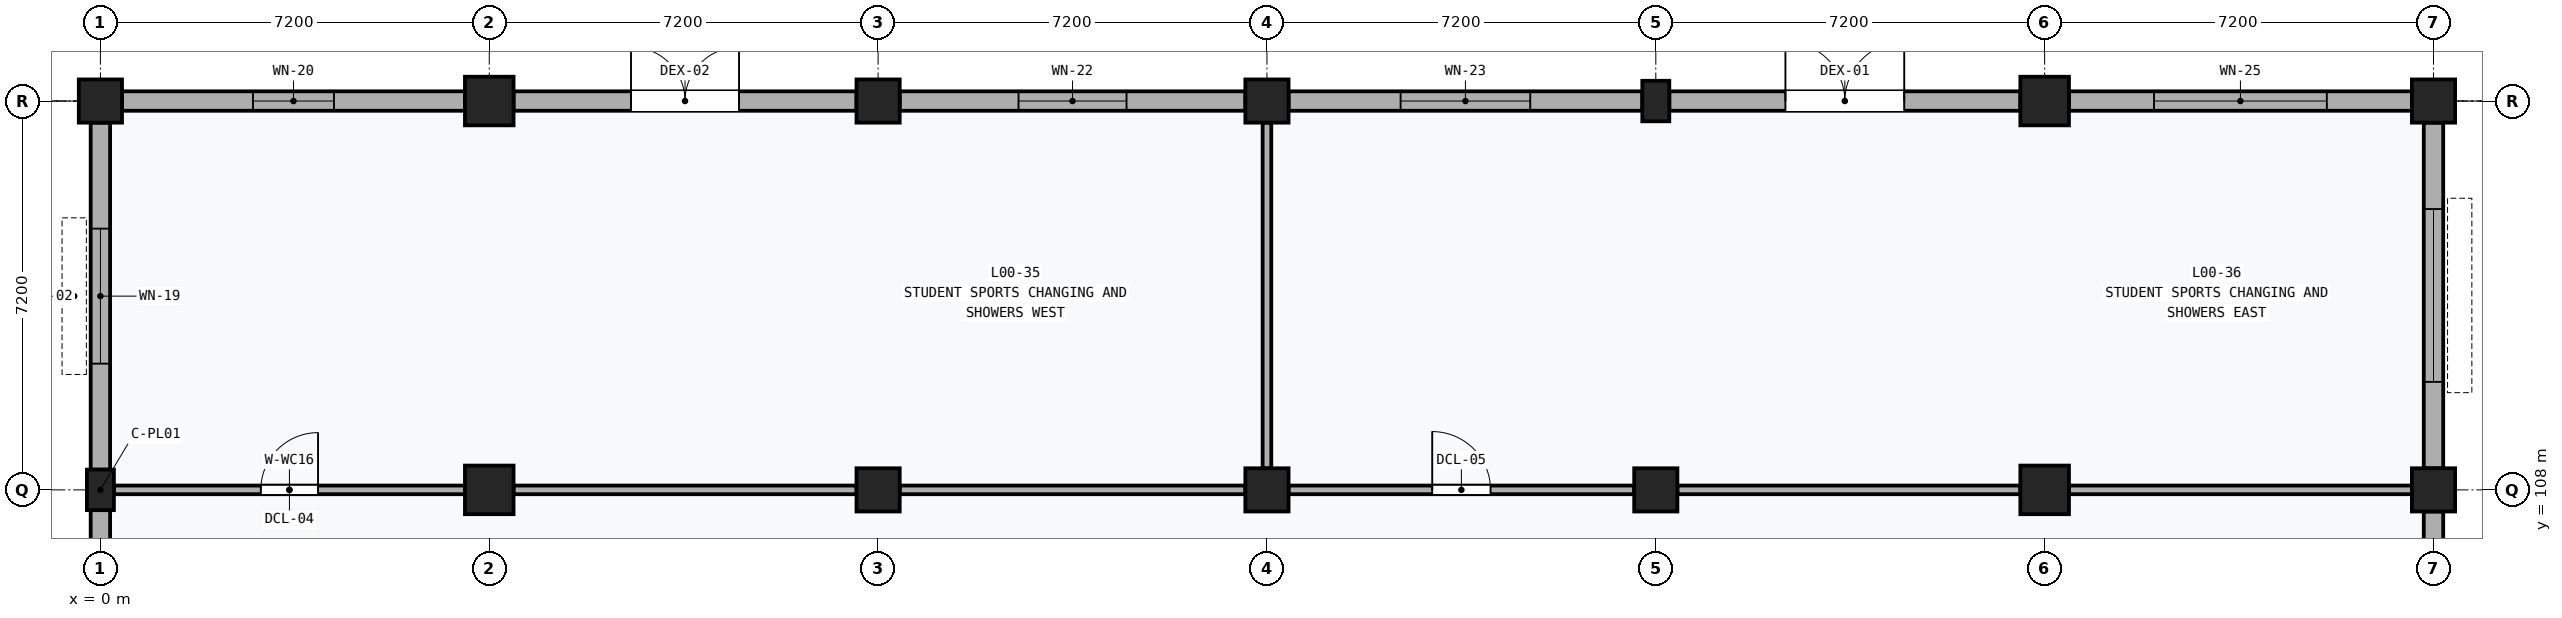
"""IFC4 building model, lengths in metres.
Left out: names, types, materials, properties, quantities, classifications, styles, units other than length and angle.
Written with IfcOpenShell. Run it as: python <this file> out.ifc"""

import sys

from ifc_helpers import new_model, si_unit, direction, frame, frame_2d, origin, origin_2d, place, context, subcontext, project, spatial, rectangle, extrude, element, fill, save


model = new_model("IFC4")
c1 = context("Model", 3, precision=1e-05, world=origin(), true_north=direction((0.0, 1.0)))
c2 = subcontext(c1, "Body", "Model", "MODEL_VIEW")
j1 = project(units=[si_unit("LENGTHUNIT", "METRE"), si_unit("PLANEANGLEUNIT", "RADIAN")], contexts=[c1])
p1 = place(None, origin())
s1 = spatial("IfcSite", under=j1, at=p1, CompositionType="ELEMENT")
p2 = place(p1, origin())
s2 = spatial("IfcBuilding", under=s1, at=p2, CompositionType="ELEMENT")
p3 = place(p2, origin())
s3 = spatial("IfcBuildingStorey", under=s2, at=p3, CompositionType="ELEMENT", Elevation=0.0)
p4 = place(p3, frame((0.0, 108.0, 0.0), z_axis=(0.0, 0.0, 1.0), x_axis=(1.0, 0.0, 0.0)))
e1 = element("IfcColumn", 1, at=p4, inside=s3, PredefinedType="PILASTER", context=c2, shape_type="SweptSolid", body=[
    extrude(rectangle(XDim=0.5, YDim=0.75, at=origin_2d()), origin(), (0.0, 0.0, 1.0), 4.8),
])
p5 = place(p3, frame((0.0, 115.2, 0.0), z_axis=(0.0, 0.0, 1.0), x_axis=(1.0, 0.0, 0.0)))
e2 = element("IfcColumn", 2, at=p5, inside=s3, PredefinedType="COLUMN", context=c2, shape_type="SweptSolid", body=[
    extrude(rectangle(XDim=0.8, YDim=0.8, at=origin_2d()), origin(), (0.0, 0.0, 1.0), 4.8),
])
for number, where, z_axis, x_axis in (
    (3, (7.2, 108.0, 0.0), (0.0, 0.0, 1.0), (1.0, 0.0, 0.0)),
    (4, (7.2, 115.2, 0.0), (0.0, 0.0, 1.0), (1.0, 0.0, 0.0)),
):
    element("IfcColumn", number, at=place(p3, frame(where, z_axis=z_axis, x_axis=x_axis)), inside=s3, PredefinedType="COLUMN", context=c2, shape_type="SweptSolid", body=[
        extrude(rectangle(XDim=0.9, YDim=0.9, at=origin_2d()), origin(), (0.0, 0.0, 1.0), 4.8),
    ])
for number, where, z_axis, x_axis in (
    (5, (14.4, 108.0, 0.0), (0.0, 0.0, 1.0), (1.0, 0.0, 0.0)),
    (6, (14.4, 115.2, 0.0), (0.0, 0.0, 1.0), (1.0, 0.0, 0.0)),
    (7, (21.6, 108.0, 0.0), (0.0, 0.0, 1.0), (1.0, 0.0, 0.0)),
    (8, (21.6, 115.2, 0.0), (0.0, 0.0, 1.0), (1.0, 0.0, 0.0)),
    (9, (28.8, 108.0, 0.0), (0.0, 0.0, 1.0), (1.0, 0.0, 0.0)),
):
    element("IfcColumn", number, at=place(p3, frame(where, z_axis=z_axis, x_axis=x_axis)), inside=s3, PredefinedType="COLUMN", context=c2, shape_type="SweptSolid", body=[
        extrude(rectangle(XDim=0.8, YDim=0.8, at=origin_2d()), origin(), (0.0, 0.0, 1.0), 4.8),
    ])
p6 = place(p3, frame((28.8, 115.2, 0.0), z_axis=(0.0, 0.0, 1.0), x_axis=(1.0, 0.0, 0.0)))
e10 = element("IfcColumn", 10, at=p6, inside=s3, PredefinedType="PILASTER", context=c2, shape_type="SweptSolid", body=[
    extrude(rectangle(XDim=0.5, YDim=0.75, at=origin_2d()), origin(), (0.0, 0.0, 1.0), 4.8),
])
for number, where, z_axis, x_axis in (
    (11, (36.0, 108.0, 0.0), (0.0, 0.0, 1.0), (1.0, 0.0, 0.0)),
    (12, (36.0, 115.2, 0.0), (0.0, 0.0, 1.0), (1.0, 0.0, 0.0)),
):
    element("IfcColumn", number, at=place(p3, frame(where, z_axis=z_axis, x_axis=x_axis)), inside=s3, PredefinedType="COLUMN", context=c2, shape_type="SweptSolid", body=[
        extrude(rectangle(XDim=0.9, YDim=0.9, at=origin_2d()), origin(), (0.0, 0.0, 1.0), 4.8),
    ])
for number, where, z_axis, x_axis in (
    (13, (43.2, 108.0, 0.0), (0.0, 0.0, 1.0), (1.0, 0.0, 0.0)),
    (14, (43.2, 115.2, 0.0), (0.0, 0.0, 1.0), (1.0, 0.0, 0.0)),
):
    element("IfcColumn", number, at=place(p3, frame(where, z_axis=z_axis, x_axis=x_axis)), inside=s3, PredefinedType="COLUMN", context=c2, shape_type="SweptSolid", body=[
        extrude(rectangle(XDim=0.8, YDim=0.8, at=origin_2d()), origin(), (0.0, 0.0, 1.0), 4.8),
    ])
p7 = place(p3, frame((0.0, 101.2, 0.0), z_axis=(0.0, 0.0, 1.0), x_axis=(0.0, 1.0, 0.0)))
e15 = element("IfcWall", 15, at=p7, inside=s3, PredefinedType="SOLIDWALL", context=c2, shape_type="SweptSolid", body=[
    extrude(rectangle(XDim=6.425, YDim=0.36, at=frame_2d((3.212, 0.0))), origin(), (0.0, 0.0, 1.0), 3.89),
])
p8 = place(p7, frame((2.113, 0.0, 1.1)))
e16 = element("IfcOpeningElement", 16, at=p8, cuts=e15, PredefinedType="OPENING", context=c2, shape_type="SweptSolid", body=[
    extrude(rectangle(XDim=2.2, YDim=1.5, at=frame_2d((1.1, 0.75))), frame((0.0, 0.192, 0.0), z_axis=(0.0, -1.0, 0.0), x_axis=(1.0, 0.0, 0.0)), (0.0, 0.0, 1.0), 0.384),
])
p9 = place(p3, frame((0.4, 115.2, 0.0), z_axis=(0.0, 0.0, 1.0), x_axis=(1.0, 0.0, 0.0)))
e17 = element("IfcWall", 17, at=p9, inside=s3, PredefinedType="SOLIDWALL", context=c2, shape_type="SweptSolid", body=[
    extrude(rectangle(XDim=6.35, YDim=0.36, at=frame_2d((3.175, 0.0))), origin(), (0.0, 0.0, 1.0), 3.89),
])
p10 = place(p9, frame((2.425, 0.0, 1.2)))
e18 = element("IfcOpeningElement", 18, at=p10, cuts=e17, PredefinedType="OPENING", context=c2, shape_type="SweptSolid", body=[
    extrude(rectangle(XDim=1.5, YDim=1.35, at=frame_2d((0.75, 0.675))), frame((0.0, 0.192, 0.0), z_axis=(0.0, -1.0, 0.0), x_axis=(1.0, 0.0, 0.0)), (0.0, 0.0, 1.0), 0.384),
])
p11 = place(p3, frame((0.0, 108.375, 0.0), z_axis=(0.0, 0.0, 1.0), x_axis=(0.0, 1.0, 0.0)))
e19 = element("IfcWall", 19, at=p11, inside=s3, PredefinedType="SOLIDWALL", context=c2, shape_type="SweptSolid", body=[
    extrude(rectangle(XDim=6.425, YDim=0.36, at=frame_2d((3.212, 0.0))), origin(), (0.0, 0.0, 1.0), 3.89),
])
p12 = place(p11, frame((1.962, 0.0, 1.1)))
e20 = element("IfcOpeningElement", 20, at=p12, cuts=e19, PredefinedType="OPENING", context=c2, shape_type="SweptSolid", body=[
    extrude(rectangle(XDim=2.5, YDim=1.5, at=frame_2d((1.25, 0.75))), frame((0.0, 0.192, 0.0), z_axis=(0.0, -1.0, 0.0), x_axis=(1.0, 0.0, 0.0)), (0.0, 0.0, 1.0), 0.384),
])
p13 = place(p3, frame((7.65, 115.2, 0.0), z_axis=(0.0, 0.0, 1.0), x_axis=(1.0, 0.0, 0.0)))
e21 = element("IfcWall", 21, at=p13, inside=s3, PredefinedType="SOLIDWALL", context=c2, shape_type="SweptSolid", body=[
    extrude(rectangle(XDim=6.35, YDim=0.36, at=frame_2d((3.175, 0.0))), origin(), (0.0, 0.0, 1.0), 3.89),
])
p14 = place(p13, frame((2.175, 0.0, 0.0)))
e22 = element("IfcOpeningElement", 22, at=p14, cuts=e21, PredefinedType="OPENING", context=c2, shape_type="SweptSolid", body=[
    extrude(rectangle(XDim=2.0, YDim=2.4, at=frame_2d((1.0, 1.2))), frame((0.0, 0.192, 0.0), z_axis=(0.0, -1.0, 0.0), x_axis=(1.0, 0.0, 0.0)), (0.0, 0.0, 1.0), 0.384),
])
p15 = place(p3, frame((14.8, 115.2, 0.0), z_axis=(0.0, 0.0, 1.0), x_axis=(1.0, 0.0, 0.0)))
e23 = element("IfcWall", 23, at=p15, inside=s3, PredefinedType="SOLIDWALL", context=c2, shape_type="SweptSolid", body=[
    extrude(rectangle(XDim=6.4, YDim=0.36, at=frame_2d((3.2, 0.0))), origin(), (0.0, 0.0, 1.0), 3.89),
])
p16 = place(p15, frame((2.2, 0.0, 0.7)))
e24 = element("IfcOpeningElement", 24, at=p16, cuts=e23, PredefinedType="OPENING", context=c2, shape_type="SweptSolid", body=[
    extrude(rectangle(XDim=2.0, YDim=2.2, at=frame_2d((1.0, 1.1))), frame((0.0, 0.192, 0.0), z_axis=(0.0, -1.0, 0.0), x_axis=(1.0, 0.0, 0.0)), (0.0, 0.0, 1.0), 0.384),
])
p17 = place(p3, frame((22.0, 115.2, 0.0), z_axis=(0.0, 0.0, 1.0), x_axis=(1.0, 0.0, 0.0)))
e25 = element("IfcWall", 25, at=p17, inside=s3, PredefinedType="SOLIDWALL", context=c2, shape_type="SweptSolid", body=[
    extrude(rectangle(XDim=6.55, YDim=0.36, at=frame_2d((3.275, 0.0))), origin(), (0.0, 0.0, 1.0), 3.89),
])
p18 = place(p17, frame((2.075, 0.0, 0.7)))
e26 = element("IfcOpeningElement", 26, at=p18, cuts=e25, PredefinedType="OPENING", context=c2, shape_type="SweptSolid", body=[
    extrude(rectangle(XDim=2.4, YDim=2.2, at=frame_2d((1.2, 1.1))), frame((0.0, 0.192, 0.0), z_axis=(0.0, -1.0, 0.0), x_axis=(1.0, 0.0, 0.0)), (0.0, 0.0, 1.0), 0.384),
])
p19 = place(p3, frame((29.05, 115.2, 0.0), z_axis=(0.0, 0.0, 1.0), x_axis=(1.0, 0.0, 0.0)))
e27 = element("IfcWall", 27, at=p19, inside=s3, PredefinedType="SOLIDWALL", context=c2, shape_type="SweptSolid", body=[
    extrude(rectangle(XDim=6.5, YDim=0.36, at=frame_2d((3.25, 0.0))), origin(), (0.0, 0.0, 1.0), 3.89),
])
p20 = place(p19, frame((2.15, 0.0, 0.0)))
e28 = element("IfcOpeningElement", 28, at=p20, cuts=e27, PredefinedType="OPENING", context=c2, shape_type="SweptSolid", body=[
    extrude(rectangle(XDim=2.2, YDim=2.4, at=frame_2d((1.1, 1.2))), frame((0.0, 0.192, 0.0), z_axis=(0.0, -1.0, 0.0), x_axis=(1.0, 0.0, 0.0)), (0.0, 0.0, 1.0), 0.384),
])
p21 = place(p3, frame((43.2, 101.175, 0.0), z_axis=(0.0, 0.0, 1.0), x_axis=(0.0, 1.0, 0.0)))
e29 = element("IfcWall", 29, at=p21, inside=s3, PredefinedType="SOLIDWALL", context=c2, shape_type="SweptSolid", body=[
    extrude(rectangle(XDim=6.425, YDim=0.36, at=frame_2d((3.212, 0.0))), origin(), (0.0, 0.0, 1.0), 3.89),
])
p22 = place(p21, frame((1.812, 0.0, 0.7)))
e30 = element("IfcOpeningElement", 30, at=p22, cuts=e29, PredefinedType="OPENING", context=c2, shape_type="SweptSolid", body=[
    extrude(rectangle(XDim=2.8, YDim=2.2, at=frame_2d((1.4, 1.1))), frame((0.0, 0.192, 0.0), z_axis=(0.0, -1.0, 0.0), x_axis=(1.0, 0.0, 0.0)), (0.0, 0.0, 1.0), 0.384),
])
p23 = place(p3, frame((36.45, 115.2, 0.0), z_axis=(0.0, 0.0, 1.0), x_axis=(1.0, 0.0, 0.0)))
e31 = element("IfcWall", 31, at=p23, inside=s3, PredefinedType="SOLIDWALL", context=c2, shape_type="SweptSolid", body=[
    extrude(rectangle(XDim=6.35, YDim=0.36, at=frame_2d((3.175, 0.0))), origin(), (0.0, 0.0, 1.0), 3.89),
])
p24 = place(p23, frame((1.575, 0.0, 0.7)))
e32 = element("IfcOpeningElement", 32, at=p24, cuts=e31, PredefinedType="OPENING", context=c2, shape_type="SweptSolid", body=[
    extrude(rectangle(XDim=3.2, YDim=2.2, at=frame_2d((1.6, 1.1))), frame((0.0, 0.192, 0.0), z_axis=(0.0, -1.0, 0.0), x_axis=(1.0, 0.0, 0.0)), (0.0, 0.0, 1.0), 0.384),
])
p25 = place(p3, frame((43.2, 108.4, 0.0), z_axis=(0.0, 0.0, 1.0), x_axis=(0.0, 1.0, 0.0)))
e33 = element("IfcWall", 33, at=p25, inside=s3, PredefinedType="SOLIDWALL", context=c2, shape_type="SweptSolid", body=[
    extrude(rectangle(XDim=6.4, YDim=0.36, at=frame_2d((3.2, 0.0))), origin(), (0.0, 0.0, 1.0), 3.89),
])
p26 = place(p25, frame((1.6, 0.0, 0.7)))
e34 = element("IfcOpeningElement", 34, at=p26, cuts=e33, PredefinedType="OPENING", context=c2, shape_type="SweptSolid", body=[
    extrude(rectangle(XDim=3.2, YDim=2.2, at=frame_2d((1.6, 1.1))), frame((0.0, 0.192, 0.0), z_axis=(0.0, -1.0, 0.0), x_axis=(1.0, 0.0, 0.0)), (0.0, 0.0, 1.0), 0.384),
])
p27 = place(p3, frame((0.25, 108.0, 0.0), z_axis=(0.0, 0.0, 1.0), x_axis=(1.0, 0.0, 0.0)))
e35 = element("IfcWall", 35, at=p27, inside=s3, PredefinedType="PARTITIONING", context=c2, shape_type="SweptSolid", body=[
    extrude(rectangle(XDim=6.5, YDim=0.16, at=frame_2d((3.25, 0.0))), origin(), (0.0, 0.0, 1.0), 3.62),
])
p28 = place(p27, frame((2.72, 0.0, 0.0)))
e36 = element("IfcOpeningElement", 36, at=p28, cuts=e35, PredefinedType="OPENING", context=c2, shape_type="SweptSolid", body=[
    extrude(rectangle(XDim=1.06, YDim=2.16, at=frame_2d((0.53, 1.08))), frame((0.0, 0.092, 0.0), z_axis=(0.0, -1.0, 0.0), x_axis=(1.0, 0.0, 0.0)), (0.0, 0.0, 1.0), 0.184),
])
p29 = place(p3, frame((7.65, 108.0, 0.0), z_axis=(0.0, 0.0, 1.0), x_axis=(1.0, 0.0, 0.0)))
e37 = element("IfcWall", 37, at=p29, inside=s3, PredefinedType="PARTITIONING", context=c2, shape_type="SweptSolid", body=[
    extrude(rectangle(XDim=6.35, YDim=0.16, at=frame_2d((3.175, 0.0))), origin(), (0.0, 0.0, 1.0), 3.62),
])
p30 = place(p3, frame((14.8, 108.0, 0.0), z_axis=(0.0, 0.0, 1.0), x_axis=(1.0, 0.0, 0.0)))
e38 = element("IfcWall", 38, at=p30, inside=s3, PredefinedType="PARTITIONING", context=c2, shape_type="SweptSolid", body=[
    extrude(rectangle(XDim=6.4, YDim=0.16, at=frame_2d((3.2, 0.0))), origin(), (0.0, 0.0, 1.0), 3.62),
])
p31 = place(p3, frame((21.6, 108.4, 0.0), z_axis=(0.0, 0.0, 1.0), x_axis=(0.0, 1.0, 0.0)))
e39 = element("IfcWall", 39, at=p31, inside=s3, PredefinedType="PARTITIONING", context=c2, shape_type="SweptSolid", body=[
    extrude(rectangle(XDim=6.4, YDim=0.16, at=frame_2d((3.2, 0.0))), origin(), (0.0, 0.0, 1.0), 3.62),
])
p32 = place(p3, frame((22.0, 108.0, 0.0), z_axis=(0.0, 0.0, 1.0), x_axis=(1.0, 0.0, 0.0)))
e40 = element("IfcWall", 40, at=p32, inside=s3, PredefinedType="PARTITIONING", context=c2, shape_type="SweptSolid", body=[
    extrude(rectangle(XDim=6.4, YDim=0.16, at=frame_2d((3.2, 0.0))), origin(), (0.0, 0.0, 1.0), 3.62),
])
p33 = place(p32, frame((2.66, 0.0, 0.0)))
e41 = element("IfcOpeningElement", 41, at=p33, cuts=e40, PredefinedType="OPENING", context=c2, shape_type="SweptSolid", body=[
    extrude(rectangle(XDim=1.08, YDim=2.18, at=frame_2d((0.54, 1.09))), frame((0.0, 0.092, 0.0), z_axis=(0.0, -1.0, 0.0), x_axis=(1.0, 0.0, 0.0)), (0.0, 0.0, 1.0), 0.184),
])
for number, where, z_axis, x_axis in (
    (42, (29.2, 108.0, 0.0), (0.0, 0.0, 1.0), (1.0, 0.0, 0.0)),
    (43, (36.45, 108.0, 0.0), (0.0, 0.0, 1.0), (1.0, 0.0, 0.0)),
):
    element("IfcWall", number, at=place(p3, frame(where, z_axis=z_axis, x_axis=x_axis)), inside=s3, PredefinedType="PARTITIONING", context=c2, shape_type="SweptSolid", body=[
        extrude(rectangle(XDim=6.35, YDim=0.16, at=frame_2d((3.175, 0.0))), origin(), (0.0, 0.0, 1.0), 3.62),
    ])
p34 = place(p10, origin())
e44 = element("IfcWindow", 44, at=p34, inside=s3, PartitioningType="SINGLE_PANEL", PredefinedType="WINDOW", context=c2, shape_type="SweptSolid", body=[
    extrude(rectangle(XDim=1.5, YDim=1.35, at=frame_2d((0.75, 0.675))), frame((0.0, 0.03, 0.0), z_axis=(0.0, -1.0, 0.0), x_axis=(1.0, 0.0, 0.0)), (0.0, 0.0, 1.0), 0.06),
])
fill(e18, e44)
p35 = place(p12, origin())
e45 = element("IfcWindow", 45, at=p35, inside=s3, PartitioningType="SINGLE_PANEL", PredefinedType="WINDOW", context=c2, shape_type="SweptSolid", body=[
    extrude(rectangle(XDim=2.5, YDim=1.5, at=frame_2d((1.25, 0.75))), frame((0.0, 0.03, 0.0), z_axis=(0.0, -1.0, 0.0), x_axis=(1.0, 0.0, 0.0)), (0.0, 0.0, 1.0), 0.06),
])
fill(e20, e45)
p36 = place(p14, origin())
e46 = element("IfcDoor", 46, at=p36, inside=s3, OperationType="DOUBLE_DOOR_SINGLE_SWING", PredefinedType="DOOR", context=c2, shape_type="SweptSolid", body=[
    extrude(rectangle(XDim=2.0, YDim=2.4, at=frame_2d((1.0, 1.2))), frame((0.0, 0.025, 0.0), z_axis=(0.0, -1.0, 0.0), x_axis=(1.0, 0.0, 0.0)), (0.0, 0.0, 1.0), 0.05),
])
fill(e22, e46)
p37 = place(p16, origin())
e47 = element("IfcWindow", 47, at=p37, inside=s3, PartitioningType="SINGLE_PANEL", PredefinedType="WINDOW", context=c2, shape_type="SweptSolid", body=[
    extrude(rectangle(XDim=2.0, YDim=2.2, at=frame_2d((1.0, 1.1))), frame((0.0, 0.03, 0.0), z_axis=(0.0, -1.0, 0.0), x_axis=(1.0, 0.0, 0.0)), (0.0, 0.0, 1.0), 0.06),
])
fill(e24, e47)
p38 = place(p18, origin())
e48 = element("IfcWindow", 48, at=p38, inside=s3, PartitioningType="SINGLE_PANEL", PredefinedType="WINDOW", context=c2, shape_type="SweptSolid", body=[
    extrude(rectangle(XDim=2.4, YDim=2.2, at=frame_2d((1.2, 1.1))), frame((0.0, 0.03, 0.0), z_axis=(0.0, -1.0, 0.0), x_axis=(1.0, 0.0, 0.0)), (0.0, 0.0, 1.0), 0.06),
])
fill(e26, e48)
p39 = place(p20, origin())
e49 = element("IfcDoor", 49, at=p39, inside=s3, OperationType="DOUBLE_DOOR_SINGLE_SWING", PredefinedType="DOOR", context=c2, shape_type="SweptSolid", body=[
    extrude(rectangle(XDim=2.2, YDim=2.4, at=frame_2d((1.1, 1.2))), frame((0.0, 0.025, 0.0), z_axis=(0.0, -1.0, 0.0), x_axis=(1.0, 0.0, 0.0)), (0.0, 0.0, 1.0), 0.05),
])
fill(e28, e49)
p40 = place(p24, origin())
e50 = element("IfcWindow", 50, at=p40, inside=s3, PartitioningType="SINGLE_PANEL", PredefinedType="WINDOW", context=c2, shape_type="SweptSolid", body=[
    extrude(rectangle(XDim=3.2, YDim=2.2, at=frame_2d((1.6, 1.1))), frame((0.0, 0.03, 0.0), z_axis=(0.0, -1.0, 0.0), x_axis=(1.0, 0.0, 0.0)), (0.0, 0.0, 1.0), 0.06),
])
fill(e32, e50)
p41 = place(p26, origin())
e51 = element("IfcWindow", 51, at=p41, inside=s3, PartitioningType="SINGLE_PANEL", PredefinedType="WINDOW", context=c2, shape_type="SweptSolid", body=[
    extrude(rectangle(XDim=3.2, YDim=2.2, at=frame_2d((1.6, 1.1))), frame((0.0, 0.03, 0.0), z_axis=(0.0, -1.0, 0.0), x_axis=(1.0, 0.0, 0.0)), (0.0, 0.0, 1.0), 0.06),
])
fill(e34, e51)
p42 = place(p28, origin())
e52 = element("IfcDoor", 52, at=p42, inside=s3, OperationType="SINGLE_SWING_RIGHT", PredefinedType="DOOR", context=c2, shape_type="SweptSolid", body=[
    extrude(rectangle(XDim=1.06, YDim=2.16, at=frame_2d((0.53, 1.08))), frame((0.0, 0.025, 0.0), z_axis=(0.0, -1.0, 0.0), x_axis=(1.0, 0.0, 0.0)), (0.0, 0.0, 1.0), 0.05),
])
fill(e36, e52)
p43 = place(p33, origin())
e53 = element("IfcDoor", 53, at=p43, inside=s3, OperationType="SINGLE_SWING_LEFT", PredefinedType="DOOR", context=c2, shape_type="SweptSolid", body=[
    extrude(rectangle(XDim=1.08, YDim=2.18, at=frame_2d((0.54, 1.09))), frame((0.0, 0.025, 0.0), z_axis=(0.0, -1.0, 0.0), x_axis=(1.0, 0.0, 0.0)), (0.0, 0.0, 1.0), 0.05),
])
fill(e41, e53)
save(model, sys.argv[1])
